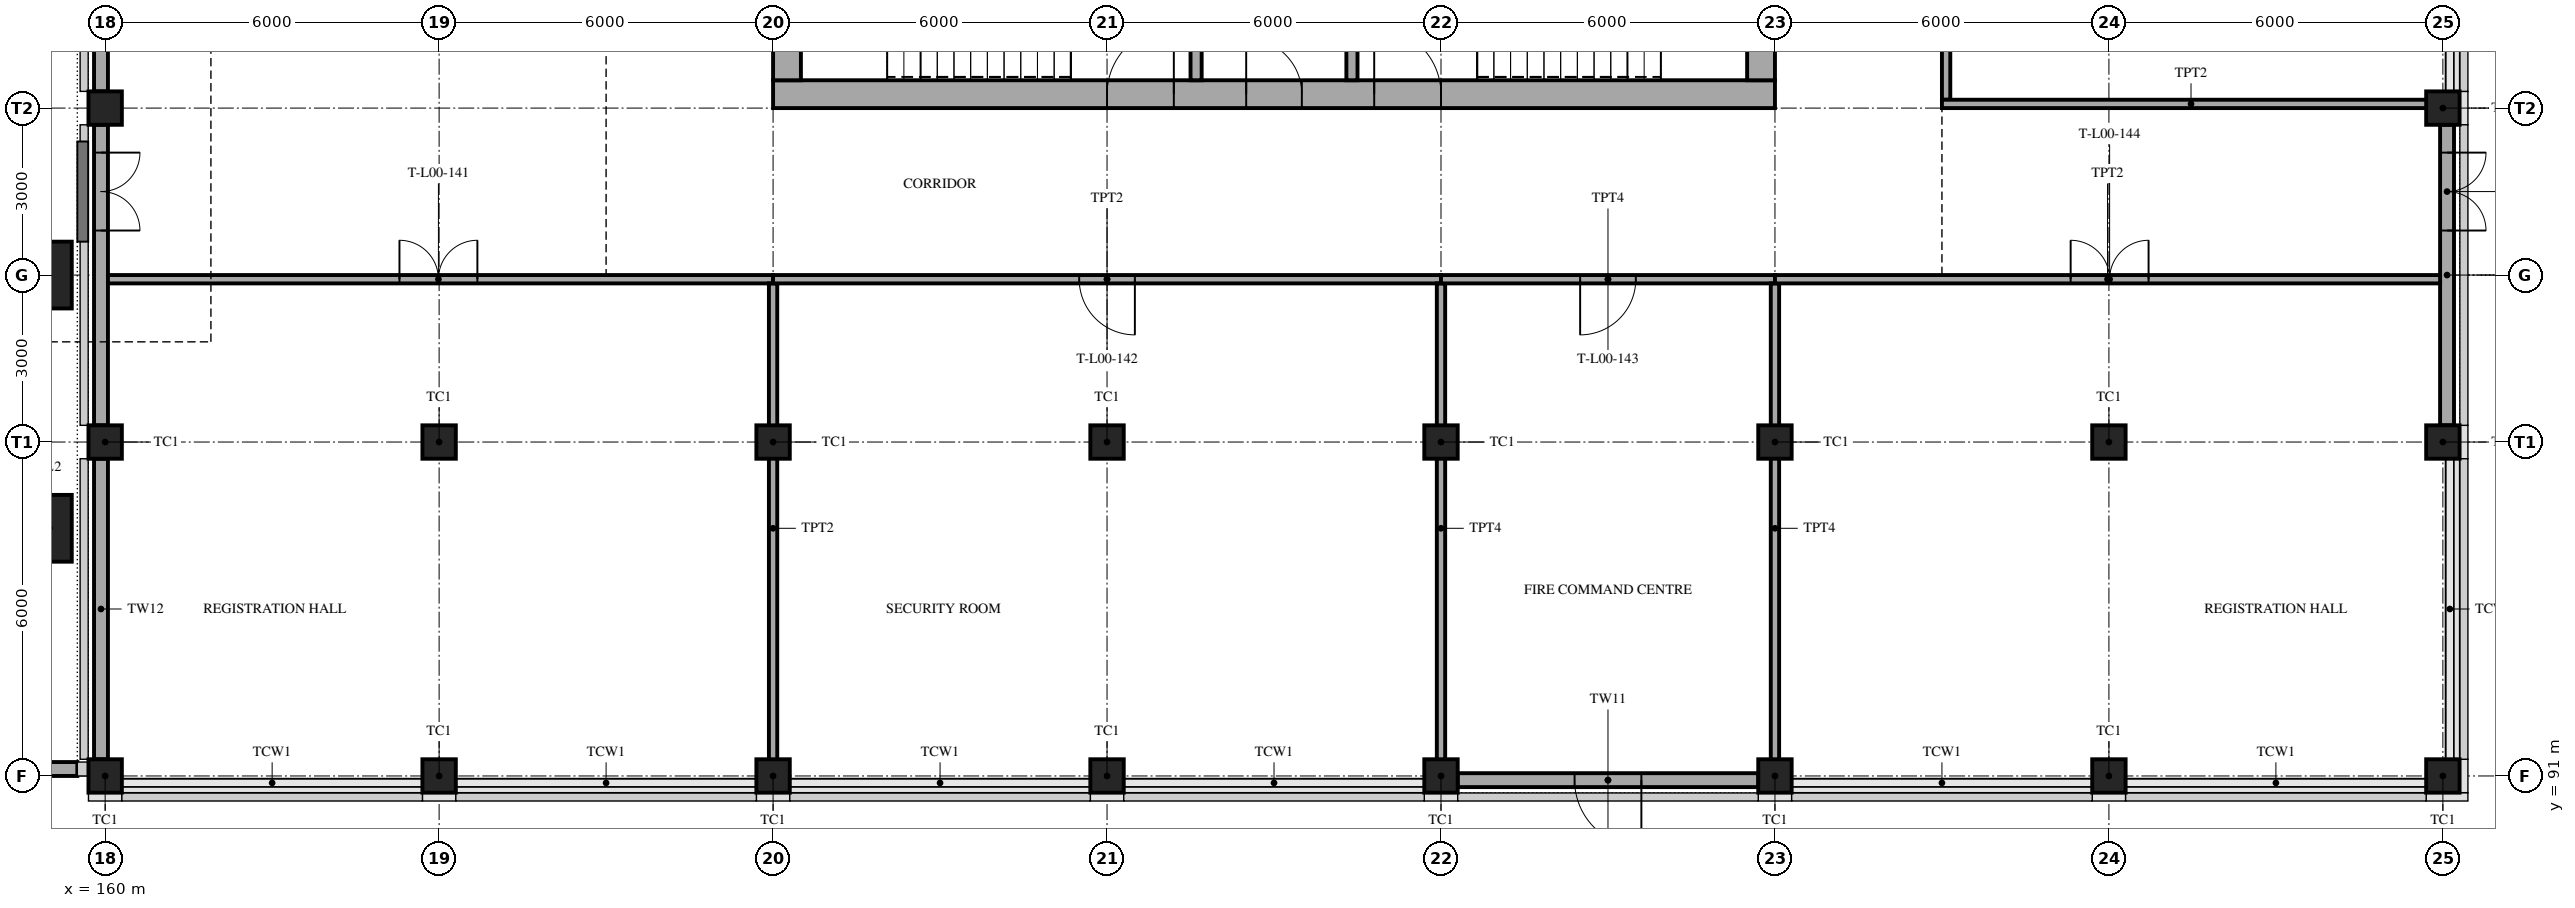
"""IFC4 building model, lengths in metres.
Left out: names, types, materials, properties, quantities, classifications, styles, units other than length and angle.
Written with IfcOpenShell. Run it as: python <this file> out.ifc"""

import sys

from ifc_helpers import new_model, si_unit, direction, frame, frame_2d, origin, origin_2d, place, context, subcontext, project, spatial, rectangle, hollow_rectangle, extrude, element, fill, save


model = new_model("IFC4")
c1 = context("Model", 3, precision=1e-05, world=origin(), true_north=direction((0.0, 1.0)))
c2 = subcontext(c1, "Body", "Model", "MODEL_VIEW")
j1 = project(units=[si_unit("LENGTHUNIT", "METRE"), si_unit("PLANEANGLEUNIT", "RADIAN")], contexts=[c1])
p1 = place(None, origin())
s1 = spatial("IfcSite", under=j1, at=p1, CompositionType="ELEMENT")
p2 = place(p1, origin())
s2 = spatial("IfcBuilding", under=s1, at=p2, CompositionType="ELEMENT")
p3 = place(p2, origin())
s3 = spatial("IfcBuildingStorey", under=s2, at=p3, CompositionType="ELEMENT", Elevation=0.0)
for number, where, z_axis, x_axis in (
    (1, (160.0, 91.0, 0.0), (0.0, 0.0, 1.0), (1.0, 0.0, 0.0)),
    (2, (160.0, 97.0, 0.0), (0.0, 0.0, 1.0), (1.0, 0.0, 0.0)),
    (3, (160.0, 103.0, 0.0), (0.0, 0.0, 1.0), (1.0, 0.0, 0.0)),
    (4, (166.0, 91.0, 0.0), (0.0, 0.0, 1.0), (1.0, 0.0, 0.0)),
    (5, (172.0, 91.0, 0.0), (0.0, 0.0, 1.0), (1.0, 0.0, 0.0)),
    (6, (178.0, 91.0, 0.0), (0.0, 0.0, 1.0), (1.0, 0.0, 0.0)),
    (7, (184.0, 91.0, 0.0), (0.0, 0.0, 1.0), (1.0, 0.0, 0.0)),
    (8, (190.0, 91.0, 0.0), (0.0, 0.0, 1.0), (1.0, 0.0, 0.0)),
    (9, (196.0, 91.0, 0.0), (0.0, 0.0, 1.0), (1.0, 0.0, 0.0)),
    (10, (202.0, 91.0, 0.0), (0.0, 0.0, 1.0), (1.0, 0.0, 0.0)),
    (11, (202.0, 97.0, 0.0), (0.0, 0.0, 1.0), (1.0, 0.0, 0.0)),
    (12, (202.0, 103.0, 0.0), (0.0, 0.0, 1.0), (1.0, 0.0, 0.0)),
    (13, (166.0, 97.0, 0.0), (0.0, 0.0, 1.0), (1.0, 0.0, 0.0)),
    (14, (172.0, 97.0, 0.0), (0.0, 0.0, 1.0), (1.0, 0.0, 0.0)),
    (15, (178.0, 97.0, 0.0), (0.0, 0.0, 1.0), (1.0, 0.0, 0.0)),
    (16, (184.0, 97.0, 0.0), (0.0, 0.0, 1.0), (1.0, 0.0, 0.0)),
    (17, (190.0, 97.0, 0.0), (0.0, 0.0, 1.0), (1.0, 0.0, 0.0)),
    (18, (196.0, 97.0, 0.0), (0.0, 0.0, 1.0), (1.0, 0.0, 0.0)),
):
    element("IfcColumn", number, at=place(p3, frame(where, z_axis=z_axis, x_axis=x_axis)), inside=s3, PredefinedType="COLUMN", context=c2, shape_type="SweptSolid", body=[
        extrude(hollow_rectangle(XDim=0.6, YDim=0.6, WallThickness=0.04, at=origin_2d()), origin(), (0.0, 0.0, 1.0), 5.0),
    ])
p4 = place(p3, frame((172.0, 103.25, 0.0), z_axis=(0.0, 0.0, 1.0), x_axis=(1.0, 0.0, 0.0)))
e19 = element("IfcWall", 19, at=p4, inside=s3, PredefinedType="SHEAR", context=c2, shape_type="SweptSolid", body=[
    extrude(rectangle(XDim=18.0, YDim=0.5, at=frame_2d((9.0, 0.0))), origin(), (0.0, 0.0, 1.0), 5.0),
])
p5 = place(p4, frame((8.5, 0.0, 0.0)))
e20 = element("IfcOpeningElement", 20, at=p5, cuts=e19, PredefinedType="OPENING", context=c2, shape_type="SweptSolid", body=[
    extrude(rectangle(XDim=1.0, YDim=2.1, at=frame_2d((0.5, 1.05))), frame((0.0, 0.26, 0.0), z_axis=(0.0, -1.0, 0.0), x_axis=(1.0, 0.0, 0.0)), (0.0, 0.0, 1.0), 0.52),
])
p6 = place(p4, frame((6.0, 0.0, 0.0)))
e21 = element("IfcOpeningElement", 21, at=p6, cuts=e19, PredefinedType="OPENING", context=c2, shape_type="SweptSolid", body=[
    extrude(rectangle(XDim=1.2, YDim=2.1, at=frame_2d((0.6, 1.05))), frame((0.0, 0.26, 0.0), z_axis=(0.0, -1.0, 0.0), x_axis=(1.0, 0.0, 0.0)), (0.0, 0.0, 1.0), 0.52),
])
p7 = place(p4, frame((10.8, 0.0, 0.0)))
e22 = element("IfcOpeningElement", 22, at=p7, cuts=e19, PredefinedType="OPENING", context=c2, shape_type="SweptSolid", body=[
    extrude(rectangle(XDim=1.2, YDim=2.1, at=frame_2d((0.6, 1.05))), frame((0.0, 0.26, 0.0), z_axis=(0.0, -1.0, 0.0), x_axis=(1.0, 0.0, 0.0)), (0.0, 0.0, 1.0), 0.52),
])
p8 = place(p3, frame((172.25, 103.5, 0.0), z_axis=(0.0, 0.0, 1.0), x_axis=(0.0, 1.0, 0.0)))
e23 = element("IfcWall", 23, at=p8, inside=s3, PredefinedType="SHEAR", context=c2, shape_type="SweptSolid", body=[
    extrude(rectangle(XDim=17.0, YDim=0.5, at=frame_2d((8.5, 0.0))), origin(), (0.0, 0.0, 1.0), 5.0),
])
p9 = place(p8, frame((7.2, 0.0, 0.0)))
e24 = element("IfcOpeningElement", 24, at=p9, cuts=e23, PredefinedType="OPENING", context=c2, shape_type="SweptSolid", body=[
    extrude(rectangle(XDim=1.4, YDim=2.1, at=frame_2d((0.7, 1.05))), frame((0.0, 0.26, 0.0), z_axis=(0.0, -1.0, 0.0), x_axis=(1.0, 0.0, 0.0)), (0.0, 0.0, 1.0), 0.52),
])
p10 = place(p3, frame((189.75, 103.5, 0.0), z_axis=(0.0, 0.0, 1.0), x_axis=(0.0, 1.0, 0.0)))
e25 = element("IfcWall", 25, at=p10, inside=s3, PredefinedType="SHEAR", context=c2, shape_type="SweptSolid", body=[
    extrude(rectangle(XDim=17.0, YDim=0.5, at=frame_2d((8.5, 0.0))), origin(), (0.0, 0.0, 1.0), 5.0),
])
p11 = place(p10, frame((7.2, 0.0, 0.0)))
e26 = element("IfcOpeningElement", 26, at=p11, cuts=e25, PredefinedType="OPENING", context=c2, shape_type="SweptSolid", body=[
    extrude(rectangle(XDim=1.4, YDim=2.1, at=frame_2d((0.7, 1.05))), frame((0.0, 0.26, 0.0), z_axis=(0.0, -1.0, 0.0), x_axis=(1.0, 0.0, 0.0)), (0.0, 0.0, 1.0), 0.52),
])
for number, where, z_axis, x_axis in (
    (27, (159.0, 95.45, 0.0), (0.0, 0.0, 1.0), (1.0, 0.0, 0.0)),
    (28, (159.0, 100.0, 0.0), (0.0, 0.0, 1.0), (1.0, 0.0, 0.0)),
):
    element("IfcColumn", number, at=place(p3, frame(where, z_axis=z_axis, x_axis=x_axis)), inside=s3, PredefinedType="COLUMN", context=c2, shape_type="SweptSolid", body=[
        extrude(rectangle(XDim=0.8, YDim=1.2, at=origin_2d()), origin(), (0.0, 0.0, 1.0), 5.0),
    ])
p12 = place(p3, frame((184.3, 90.925, 0.0), z_axis=(0.0, 0.0, 1.0), x_axis=(1.0, 0.0, 0.0)))
e29 = element("IfcWall", 29, at=p12, inside=s3, PredefinedType="SOLIDWALL", context=c2, shape_type="SweptSolid", body=[
    extrude(rectangle(XDim=5.4, YDim=0.25, at=frame_2d((2.7, 0.0))), origin(), (0.0, 0.0, 1.0), 4.35),
])
p13 = place(p12, frame((2.1, 0.0, 0.0)))
e30 = element("IfcOpeningElement", 30, at=p13, cuts=e29, PredefinedType="OPENING", context=c2, shape_type="SweptSolid", body=[
    extrude(rectangle(XDim=1.2, YDim=2.1, at=frame_2d((0.6, 1.05))), frame((0.0, 0.135, 0.0), z_axis=(0.0, -1.0, 0.0), x_axis=(1.0, 0.0, 0.0)), (0.0, 0.0, 1.0), 0.27),
])
p14 = place(p3, frame((159.925, 91.3, 0.0), z_axis=(0.0, 0.0, 1.0), x_axis=(0.0, 1.0, 0.0)))
e31 = element("IfcWall", 31, at=p14, inside=s3, PredefinedType="SOLIDWALL", context=c2, shape_type="SweptSolid", body=[
    extrude(rectangle(XDim=5.4, YDim=0.25, at=frame_2d((2.7, 0.0))), origin(), (0.0, 0.0, 1.0), 4.35),
])
p15 = place(p3, frame((159.925, 97.3, 0.0), z_axis=(0.0, 0.0, 1.0), x_axis=(0.0, 1.0, 0.0)))
e32 = element("IfcWall", 32, at=p15, inside=s3, PredefinedType="SOLIDWALL", context=c2, shape_type="SweptSolid", body=[
    extrude(rectangle(XDim=5.4, YDim=0.25, at=frame_2d((2.7, 0.0))), origin(), (0.0, 0.0, 1.0), 4.35),
])
p16 = place(p15, frame((3.5, 0.0, 0.0)))
e33 = element("IfcOpeningElement", 33, at=p16, cuts=e32, PredefinedType="OPENING", context=c2, shape_type="SweptSolid", body=[
    extrude(rectangle(XDim=1.4, YDim=2.1, at=frame_2d((0.7, 1.05))), frame((0.0, 0.135, 0.0), z_axis=(0.0, -1.0, 0.0), x_axis=(1.0, 0.0, 0.0)), (0.0, 0.0, 1.0), 0.27),
])
p17 = place(p3, frame((159.925, 103.3, 0.0), z_axis=(0.0, 0.0, 1.0), x_axis=(0.0, 1.0, 0.0)))
e34 = element("IfcWall", 34, at=p17, inside=s3, PredefinedType="SOLIDWALL", context=c2, shape_type="SweptSolid", body=[
    extrude(rectangle(XDim=5.4, YDim=0.25, at=frame_2d((2.7, 0.0))), origin(), (0.0, 0.0, 1.0), 4.35),
])
p18 = place(p3, frame((202.075, 97.3, 0.0), z_axis=(0.0, 0.0, 1.0), x_axis=(0.0, 1.0, 0.0)))
e35 = element("IfcWall", 35, at=p18, inside=s3, PredefinedType="SOLIDWALL", context=c2, shape_type="SweptSolid", body=[
    extrude(rectangle(XDim=5.4, YDim=0.25, at=frame_2d((2.7, 0.0))), origin(), (0.0, 0.0, 1.0), 4.35),
])
p19 = place(p18, frame((3.5, 0.0, 0.0)))
e36 = element("IfcOpeningElement", 36, at=p19, cuts=e35, PredefinedType="OPENING", context=c2, shape_type="SweptSolid", body=[
    extrude(rectangle(XDim=1.4, YDim=2.1, at=frame_2d((0.7, 1.05))), frame((0.0, 0.135, 0.0), z_axis=(0.0, -1.0, 0.0), x_axis=(1.0, 0.0, 0.0)), (0.0, 0.0, 1.0), 0.27),
])
for number, where, z_axis, x_axis in (
    (37, (179.6, 103.5, 0.0), (0.0, 0.0, 1.0), (0.0, 1.0, 0.0)),
    (38, (182.4, 103.5, 0.0), (0.0, 0.0, 1.0), (0.0, 1.0, 0.0)),
):
    element("IfcWall", number, at=place(p3, frame(where, z_axis=z_axis, x_axis=x_axis)), inside=s3, PredefinedType="SOLIDWALL", context=c2, shape_type="SweptSolid", body=[
        extrude(rectangle(XDim=3.2, YDim=0.2, at=frame_2d((1.6, 0.0))), origin(), (0.0, 0.0, 1.0), 4.8),
    ])
p20 = place(p3, frame((152.45, 91.125, 0.0), z_axis=(0.0, 0.0, 1.0), x_axis=(1.0, 0.0, 0.0)))
e39 = element("IfcWall", 39, at=p20, inside=s3, PredefinedType="SOLIDWALL", context=c2, shape_type="SweptSolid", body=[
    extrude(rectangle(XDim=7.05, YDim=0.25, at=frame_2d((3.525, 0.0))), origin(), (0.0, 0.0, 1.0), 4.59),
])
p21 = place(p3, frame((160.05, 99.925, 0.0), z_axis=(0.0, 0.0, 1.0), x_axis=(1.0, 0.0, 0.0)))
e40 = element("IfcWall", 40, at=p21, inside=s3, PredefinedType="PARTITIONING", context=c2, shape_type="SweptSolid", body=[
    extrude(rectangle(XDim=11.95, YDim=0.15, at=frame_2d((5.975, 0.0))), origin(), (0.0, 0.0, 1.0), 4.2),
])
p22 = place(p21, frame((5.238, 0.0, 0.0)))
e41 = element("IfcOpeningElement", 41, at=p22, cuts=e40, PredefinedType="OPENING", context=c2, shape_type="SweptSolid", body=[
    extrude(rectangle(XDim=1.4, YDim=2.1, at=frame_2d((0.7, 1.05))), frame((0.0, 0.085, 0.0), z_axis=(0.0, -1.0, 0.0), x_axis=(1.0, 0.0, 0.0)), (0.0, 0.0, 1.0), 0.17),
])
p23 = place(p3, frame((172.0, 91.05, 0.0), z_axis=(0.0, 0.0, 1.0), x_axis=(0.0, 1.0, 0.0)))
e42 = element("IfcWall", 42, at=p23, inside=s3, PredefinedType="PARTITIONING", context=c2, shape_type="SweptSolid", body=[
    extrude(rectangle(XDim=8.8, YDim=0.15, at=frame_2d((4.4, 0.0))), origin(), (0.0, 0.0, 1.0), 4.2),
])
p24 = place(p3, frame((172.0, 99.925, 0.0), z_axis=(0.0, 0.0, 1.0), x_axis=(1.0, 0.0, 0.0)))
e43 = element("IfcWall", 43, at=p24, inside=s3, PredefinedType="PARTITIONING", context=c2, shape_type="SweptSolid", body=[
    extrude(rectangle(XDim=12.0, YDim=0.15, at=frame_2d((6.0, 0.0))), origin(), (0.0, 0.0, 1.0), 4.2),
])
p25 = place(p24, frame((5.5, 0.0, 0.0)))
e44 = element("IfcOpeningElement", 44, at=p25, cuts=e43, PredefinedType="OPENING", context=c2, shape_type="SweptSolid", body=[
    extrude(rectangle(XDim=1.0, YDim=2.1, at=frame_2d((0.5, 1.05))), frame((0.0, 0.085, 0.0), z_axis=(0.0, -1.0, 0.0), x_axis=(1.0, 0.0, 0.0)), (0.0, 0.0, 1.0), 0.17),
])
p26 = place(p3, frame((184.0, 91.05, 0.0), z_axis=(0.0, 0.0, 1.0), x_axis=(0.0, 1.0, 0.0)))
e45 = element("IfcWall", 45, at=p26, inside=s3, PredefinedType="PARTITIONING", context=c2, shape_type="SweptSolid", body=[
    extrude(rectangle(XDim=8.8, YDim=0.15, at=frame_2d((4.4, 0.0))), origin(), (0.0, 0.0, 1.0), 4.2),
])
p27 = place(p3, frame((184.0, 99.925, 0.0), z_axis=(0.0, 0.0, 1.0), x_axis=(1.0, 0.0, 0.0)))
e46 = element("IfcWall", 46, at=p27, inside=s3, PredefinedType="PARTITIONING", context=c2, shape_type="SweptSolid", body=[
    extrude(rectangle(XDim=6.0, YDim=0.15, at=frame_2d((3.0, 0.0))), origin(), (0.0, 0.0, 1.0), 4.2),
])
p28 = place(p27, frame((2.5, 0.0, 0.0)))
e47 = element("IfcOpeningElement", 47, at=p28, cuts=e46, PredefinedType="OPENING", context=c2, shape_type="SweptSolid", body=[
    extrude(rectangle(XDim=1.0, YDim=2.1, at=frame_2d((0.5, 1.05))), frame((0.0, 0.085, 0.0), z_axis=(0.0, -1.0, 0.0), x_axis=(1.0, 0.0, 0.0)), (0.0, 0.0, 1.0), 0.17),
])
p29 = place(p3, frame((190.0, 91.05, 0.0), z_axis=(0.0, 0.0, 1.0), x_axis=(0.0, 1.0, 0.0)))
e48 = element("IfcWall", 48, at=p29, inside=s3, PredefinedType="PARTITIONING", context=c2, shape_type="SweptSolid", body=[
    extrude(rectangle(XDim=8.8, YDim=0.15, at=frame_2d((4.4, 0.0))), origin(), (0.0, 0.0, 1.0), 4.2),
])
p30 = place(p3, frame((190.0, 99.925, 0.0), z_axis=(0.0, 0.0, 1.0), x_axis=(1.0, 0.0, 0.0)))
e49 = element("IfcWall", 49, at=p30, inside=s3, PredefinedType="PARTITIONING", context=c2, shape_type="SweptSolid", body=[
    extrude(rectangle(XDim=11.95, YDim=0.15, at=frame_2d((5.975, 0.0))), origin(), (0.0, 0.0, 1.0), 4.2),
])
p31 = place(p30, frame((5.312, 0.0, 0.0)))
e50 = element("IfcOpeningElement", 50, at=p31, cuts=e49, PredefinedType="OPENING", context=c2, shape_type="SweptSolid", body=[
    extrude(rectangle(XDim=1.4, YDim=2.1, at=frame_2d((0.7, 1.05))), frame((0.0, 0.085, 0.0), z_axis=(0.0, -1.0, 0.0), x_axis=(1.0, 0.0, 0.0)), (0.0, 0.0, 1.0), 0.17),
])
p32 = place(p3, frame((193.075, 103.15, 0.0), z_axis=(0.0, 0.0, 1.0), x_axis=(0.0, 1.0, 0.0)))
e51 = element("IfcWall", 51, at=p32, inside=s3, PredefinedType="PARTITIONING", context=c2, shape_type="SweptSolid", body=[
    extrude(rectangle(XDim=5.85, YDim=0.15, at=frame_2d((2.925, 0.0))), origin(), (0.0, 0.0, 1.0), 4.2),
])
p33 = place(p32, frame((2.387, 0.0, 0.0)))
e52 = element("IfcOpeningElement", 52, at=p33, cuts=e51, PredefinedType="OPENING", context=c2, shape_type="SweptSolid", body=[
    extrude(rectangle(XDim=1.0, YDim=2.1, at=frame_2d((0.5, 1.05))), frame((0.0, 0.085, 0.0), z_axis=(0.0, -1.0, 0.0), x_axis=(1.0, 0.0, 0.0)), (0.0, 0.0, 1.0), 0.17),
])
p34 = place(p3, frame((193.0, 103.075, 0.0), z_axis=(0.0, 0.0, 1.0), x_axis=(1.0, 0.0, 0.0)))
e53 = element("IfcWall", 53, at=p34, inside=s3, PredefinedType="PARTITIONING", context=c2, shape_type="SweptSolid", body=[
    extrude(rectangle(XDim=8.95, YDim=0.15, at=frame_2d((4.475, 0.0))), origin(), (0.0, 0.0, 1.0), 4.2),
])
p35 = place(p13, frame((1.2, 0.0, 0.0), z_axis=(0.0, 0.0, 1.0), x_axis=(-1.0, 0.0, 0.0)))
e54 = element("IfcDoor", 54, at=p35, inside=s3, OperationType="SINGLE_SWING_LEFT", PredefinedType="DOOR", context=c2, shape_type="SweptSolid", body=[
    extrude(rectangle(XDim=1.2, YDim=2.1, at=frame_2d((0.6, 1.05))), frame((0.0, 0.025, 0.0), z_axis=(0.0, -1.0, 0.0), x_axis=(1.0, 0.0, 0.0)), (0.0, 0.0, 1.0), 0.05),
])
fill(e30, e54)
p36 = place(p16, frame((1.4, 0.0, 0.0), z_axis=(0.0, 0.0, 1.0), x_axis=(-1.0, 0.0, 0.0)))
e55 = element("IfcDoor", 55, at=p36, inside=s3, OperationType="DOUBLE_DOOR_SINGLE_SWING", PredefinedType="DOOR", context=c2, shape_type="SweptSolid", body=[
    extrude(rectangle(XDim=1.4, YDim=2.1, at=frame_2d((0.7, 1.05))), frame((0.0, 0.025, 0.0), z_axis=(0.0, -1.0, 0.0), x_axis=(1.0, 0.0, 0.0)), (0.0, 0.0, 1.0), 0.05),
])
fill(e33, e55)
p37 = place(p19, frame((1.4, 0.0, 0.0), z_axis=(0.0, 0.0, 1.0), x_axis=(-1.0, 0.0, 0.0)))
e56 = element("IfcDoor", 56, at=p37, inside=s3, OperationType="DOUBLE_DOOR_SINGLE_SWING", PredefinedType="DOOR", context=c2, shape_type="SweptSolid", body=[
    extrude(rectangle(XDim=1.4, YDim=2.1, at=frame_2d((0.7, 1.05))), frame((0.0, 0.025, 0.0), z_axis=(0.0, -1.0, 0.0), x_axis=(1.0, 0.0, 0.0)), (0.0, 0.0, 1.0), 0.05),
])
fill(e36, e56)
p38 = place(p5, origin())
e57 = element("IfcDoor", 57, at=p38, inside=s3, OperationType="SINGLE_SWING_LEFT", PredefinedType="DOOR", context=c2, shape_type="SweptSolid", body=[
    extrude(rectangle(XDim=1.0, YDim=2.1, at=frame_2d((0.5, 1.05))), frame((0.0, 0.025, 0.0), z_axis=(0.0, -1.0, 0.0), x_axis=(1.0, 0.0, 0.0)), (0.0, 0.0, 1.0), 0.05),
])
fill(e20, e57)
p39 = place(p6, origin())
e58 = element("IfcDoor", 58, at=p39, inside=s3, OperationType="SINGLE_SWING_RIGHT", PredefinedType="DOOR", context=c2, shape_type="SweptSolid", body=[
    extrude(rectangle(XDim=1.2, YDim=2.1, at=frame_2d((0.6, 1.05))), frame((0.0, 0.025, 0.0), z_axis=(0.0, -1.0, 0.0), x_axis=(1.0, 0.0, 0.0)), (0.0, 0.0, 1.0), 0.05),
])
fill(e21, e58)
p40 = place(p7, origin())
e59 = element("IfcDoor", 59, at=p40, inside=s3, OperationType="SINGLE_SWING_LEFT", PredefinedType="DOOR", context=c2, shape_type="SweptSolid", body=[
    extrude(rectangle(XDim=1.2, YDim=2.1, at=frame_2d((0.6, 1.05))), frame((0.0, 0.025, 0.0), z_axis=(0.0, -1.0, 0.0), x_axis=(1.0, 0.0, 0.0)), (0.0, 0.0, 1.0), 0.05),
])
fill(e22, e59)
p41 = place(p22, origin())
e60 = element("IfcDoor", 60, at=p41, inside=s3, OperationType="DOUBLE_DOOR_SINGLE_SWING", PredefinedType="DOOR", context=c2, shape_type="SweptSolid", body=[
    extrude(rectangle(XDim=1.4, YDim=2.1, at=frame_2d((0.7, 1.05))), frame((0.0, 0.025, 0.0), z_axis=(0.0, -1.0, 0.0), x_axis=(1.0, 0.0, 0.0)), (0.0, 0.0, 1.0), 0.05),
])
fill(e41, e60)
p42 = place(p25, frame((1.0, 0.0, 0.0), z_axis=(0.0, 0.0, 1.0), x_axis=(-1.0, 0.0, 0.0)))
e61 = element("IfcDoor", 61, at=p42, inside=s3, OperationType="SINGLE_SWING_LEFT", PredefinedType="DOOR", context=c2, shape_type="SweptSolid", body=[
    extrude(rectangle(XDim=1.0, YDim=2.1, at=frame_2d((0.5, 1.05))), frame((0.0, 0.025, 0.0), z_axis=(0.0, -1.0, 0.0), x_axis=(1.0, 0.0, 0.0)), (0.0, 0.0, 1.0), 0.05),
])
fill(e44, e61)
p43 = place(p28, frame((1.0, 0.0, 0.0), z_axis=(0.0, 0.0, 1.0), x_axis=(-1.0, 0.0, 0.0)))
e62 = element("IfcDoor", 62, at=p43, inside=s3, OperationType="SINGLE_SWING_RIGHT", PredefinedType="DOOR", context=c2, shape_type="SweptSolid", body=[
    extrude(rectangle(XDim=1.0, YDim=2.1, at=frame_2d((0.5, 1.05))), frame((0.0, 0.025, 0.0), z_axis=(0.0, -1.0, 0.0), x_axis=(1.0, 0.0, 0.0)), (0.0, 0.0, 1.0), 0.05),
])
fill(e47, e62)
p44 = place(p31, origin())
e63 = element("IfcDoor", 63, at=p44, inside=s3, OperationType="DOUBLE_DOOR_SINGLE_SWING", PredefinedType="DOOR", context=c2, shape_type="SweptSolid", body=[
    extrude(rectangle(XDim=1.4, YDim=2.1, at=frame_2d((0.7, 1.05))), frame((0.0, 0.025, 0.0), z_axis=(0.0, -1.0, 0.0), x_axis=(1.0, 0.0, 0.0)), (0.0, 0.0, 1.0), 0.05),
])
fill(e50, e63)
save(model, sys.argv[1])
